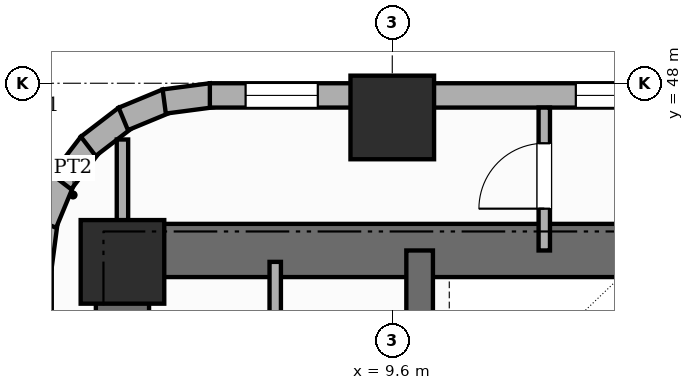
"""IFC4 building model, lengths in metres.
Left out: names, types, materials, properties, quantities, classifications, styles, units other than length and angle.
Written with IfcOpenShell. Run it as: python <this file> out.ifc"""

import sys

from ifc_helpers import new_model, si_unit, direction, frame, frame_2d, origin, origin_2d, place, context, subcontext, project, spatial, rectangle, extrude, element, fill, save


model = new_model("IFC4")
c1 = context("Model", 3, precision=1e-05, world=origin(), true_north=direction((0.0, 1.0)))
c2 = subcontext(c1, "Body", "Model", "MODEL_VIEW")
j1 = project(units=[si_unit("LENGTHUNIT", "METRE"), si_unit("PLANEANGLEUNIT", "RADIAN")], contexts=[c1])
p1 = place(None, origin())
s1 = spatial("IfcSite", under=j1, at=p1, CompositionType="ELEMENT")
p2 = place(p1, origin())
s2 = spatial("IfcBuilding", under=s1, at=p2, CompositionType="ELEMENT")
p3 = place(p2, frame((0.0, 0.0, 28.6)))
s3 = spatial("IfcBuildingStorey", under=s2, at=p3, CompositionType="ELEMENT", Elevation=28.6)
p4 = place(p3, frame((6.05, 30.55, 0.0), z_axis=(0.0, 0.0, 1.0), x_axis=(0.0, 1.0, 0.0)))
e1 = element("IfcWall", 1, at=p4, inside=s3, PredefinedType="SHEAR", context=c2, shape_type="SweptSolid", body=[
    extrude(rectangle(XDim=15.6, YDim=0.7, at=frame_2d((7.8, 0.0))), origin(), (0.0, 0.0, 1.0), 3.6),
])
p5 = place(p3, frame((6.05, 45.8, 0.0), z_axis=(0.0, 0.0, 1.0), x_axis=(1.0, 0.0, 0.0)))
e2 = element("IfcWall", 2, at=p5, inside=s3, PredefinedType="SHEAR", context=c2, shape_type="SweptSolid", body=[
    extrude(rectangle(XDim=16.7, YDim=0.7, at=frame_2d((8.35, 0.0))), origin(), (0.0, 0.0, 1.0), 3.6),
])
p6 = place(p3, frame((9.96, 30.9, 0.0), z_axis=(0.0, 0.0, 1.0), x_axis=(0.0, 1.0, 0.0)))
e3 = element("IfcWall", 3, at=p6, inside=s3, PredefinedType="SHEAR", context=c2, shape_type="SweptSolid", body=[
    extrude(rectangle(XDim=14.9, YDim=0.35, at=frame_2d((7.45, 0.0))), origin(), (0.0, 0.0, 1.0), 3.6),
])
p7 = place(p6, frame((0.65, 0.0, 0.0)))
e4 = element("IfcOpeningElement", 4, at=p7, cuts=e3, PredefinedType="OPENING", context=c2, shape_type="SweptSolid", body=[
    extrude(rectangle(XDim=0.95, YDim=2.1, at=frame_2d((0.475, 1.05))), frame((0.0, 0.185, 0.0), z_axis=(0.0, -1.0, 0.0), x_axis=(1.0, 0.0, 0.0)), (0.0, 0.0, 1.0), 0.37),
])
p8 = place(p6, frame((10.45, 0.0, 0.0)))
e5 = element("IfcOpeningElement", 5, at=p8, cuts=e3, PredefinedType="OPENING", context=c2, shape_type="SweptSolid", body=[
    extrude(rectangle(XDim=1.0, YDim=2.15, at=frame_2d((0.5, 1.075))), frame((0.0, 0.185, 0.0), z_axis=(0.0, -1.0, 0.0), x_axis=(1.0, 0.0, 0.0)), (0.0, 0.0, 1.0), 0.37),
])
for number, where, z_axis, x_axis in (
    (6, (6.05, 45.65, 0.0), (0.0, 0.0, 1.0), (1.0, 0.0, 0.0)),
    (7, (9.6, 47.55, 0.0), (0.0, 0.0, 1.0), (1.0, 0.0, 0.0)),
):
    element("IfcColumn", number, at=place(p3, frame(where, z_axis=z_axis, x_axis=x_axis)), inside=s3, PredefinedType="COLUMN", context=c2, shape_type="SweptSolid", body=[
        extrude(rectangle(XDim=1.1, YDim=1.1, at=origin_2d()), origin(), (0.0, 0.0, 1.0), 3.6),
    ])
for number, where, z_axis, x_axis in (
    (8, (4.958, 45.579, 0.0), (0.0, 0.0, 1.0), (0.131, 0.991, 0.0)),
    (9, (5.03, 46.16, 0.0), (0.0, 0.0, 1.0), (0.383, 0.924, 0.0)),
):
    element("IfcWall", number, at=place(p3, frame(where, z_axis=z_axis, x_axis=x_axis)), inside=s3, PredefinedType="STANDARD", context=c2, shape_type="SweptSolid", body=[
        extrude(rectangle(XDim=0.626, YDim=0.32, at=frame_2d((0.313, 0.0))), origin(), (0.0, 0.0, 1.0), 3.35),
    ])
p9 = place(p3, frame((5.248, 46.703, 0.0), z_axis=(0.0, 0.0, 1.0), x_axis=(0.608938521285, 0.7932174212, 0.0)))
e10 = element("IfcWall", 10, at=p9, inside=s3, PredefinedType="STANDARD", context=c2, shape_type="SweptSolid", body=[
    extrude(rectangle(XDim=0.627, YDim=0.32, at=frame_2d((0.313, 0.0))), origin(), (0.0, 0.0, 1.0), 3.35),
])
p10 = place(p3, frame((5.6, 47.17, 0.0), z_axis=(0.0, 0.0, 1.0), x_axis=(0.793405610854, 0.608693302629, 0.0)))
e11 = element("IfcWall", 11, at=p10, inside=s3, PredefinedType="STANDARD", context=c2, shape_type="SweptSolid", body=[
    extrude(rectangle(XDim=0.626, YDim=0.32, at=frame_2d((0.313, 0.0))), origin(), (0.0, 0.0, 1.0), 3.35),
])
p11 = place(p3, frame((6.061, 47.531, 0.0), z_axis=(0.0, 0.0, 1.0), x_axis=(0.923836271867, 0.382787856107, 0.0)))
e12 = element("IfcWall", 12, at=p11, inside=s3, PredefinedType="STANDARD", context=c2, shape_type="SweptSolid", body=[
    extrude(rectangle(XDim=0.626, YDim=0.32, at=frame_2d((0.313, 0.0))), origin(), (0.0, 0.0, 1.0), 3.35),
])
p12 = place(p3, frame((6.6, 47.76, 0.0), z_axis=(0.0, 0.0, 1.0), x_axis=(0.991447664465, 0.130504898859, 0.0)))
e13 = element("IfcWall", 13, at=p12, inside=s3, PredefinedType="STANDARD", context=c2, shape_type="SweptSolid", body=[
    extrude(rectangle(XDim=0.627, YDim=0.32, at=frame_2d((0.313, 0.0))), origin(), (0.0, 0.0, 1.0), 3.35),
])
p13 = place(p3, frame((7.2, 47.84, 0.0), z_axis=(0.0, 0.0, 1.0), x_axis=(1.0, 0.0, 0.0)))
e14 = element("IfcWall", 14, at=p13, inside=s3, PredefinedType="STANDARD", context=c2, shape_type="SweptSolid", body=[
    extrude(rectangle(XDim=48.0, YDim=0.32, at=frame_2d((24.0, 0.0))), origin(), (0.0, 0.0, 1.0), 2.53),
])
p14 = place(p13, frame((24.97, 0.0, 0.45)))
e15 = element("IfcOpeningElement", 15, at=p14, cuts=e14, PredefinedType="OPENING", context=c2, shape_type="SweptSolid", body=[
    extrude(rectangle(XDim=0.6, YDim=1.8, at=frame_2d((0.3, 0.9))), frame((0.0, 0.17, 0.0), z_axis=(0.0, -1.0, 0.0), x_axis=(1.0, 0.0, 0.0)), (0.0, 0.0, 1.0), 0.34),
])
p15 = place(p13, frame((32.435, 0.0, 0.65)))
e16 = element("IfcOpeningElement", 16, at=p15, cuts=e14, PredefinedType="OPENING", context=c2, shape_type="SweptSolid", body=[
    extrude(rectangle(XDim=1.4, YDim=1.1, at=frame_2d((0.7, 0.55))), frame((0.0, 0.17, 0.0), z_axis=(0.0, -1.0, 0.0), x_axis=(1.0, 0.0, 0.0)), (0.0, 0.0, 1.0), 0.34),
])
p16 = place(p13, frame((47.094, 0.0, 0.45)))
e17 = element("IfcOpeningElement", 17, at=p16, cuts=e14, PredefinedType="OPENING", context=c2, shape_type="SweptSolid", body=[
    extrude(rectangle(XDim=0.6, YDim=1.8, at=frame_2d((0.3, 0.9))), frame((0.0, 0.17, 0.0), z_axis=(0.0, -1.0, 0.0), x_axis=(1.0, 0.0, 0.0)), (0.0, 0.0, 1.0), 0.34),
])
p17 = place(p13, frame((18.74, 0.0, 0.45)))
e18 = element("IfcOpeningElement", 18, at=p17, cuts=e14, PredefinedType="OPENING", context=c2, shape_type="SweptSolid", body=[
    extrude(rectangle(XDim=0.95, YDim=1.8, at=frame_2d((0.475, 0.9))), frame((0.0, 0.17, 0.0), z_axis=(0.0, -1.0, 0.0), x_axis=(1.0, 0.0, 0.0)), (0.0, 0.0, 1.0), 0.34),
])
p18 = place(p13, frame((41.65, 0.0, 0.45)))
e19 = element("IfcOpeningElement", 19, at=p18, cuts=e14, PredefinedType="OPENING", context=c2, shape_type="SweptSolid", body=[
    extrude(rectangle(XDim=0.75, YDim=1.8, at=frame_2d((0.375, 0.9))), frame((0.0, 0.17, 0.0), z_axis=(0.0, -1.0, 0.0), x_axis=(1.0, 0.0, 0.0)), (0.0, 0.0, 1.0), 0.34),
])
p19 = place(p13, frame((37.736, 0.0, 0.65)))
e20 = element("IfcOpeningElement", 20, at=p19, cuts=e14, PredefinedType="OPENING", context=c2, shape_type="SweptSolid", body=[
    extrude(rectangle(XDim=1.4, YDim=1.1, at=frame_2d((0.7, 0.55))), frame((0.0, 0.17, 0.0), z_axis=(0.0, -1.0, 0.0), x_axis=(1.0, 0.0, 0.0)), (0.0, 0.0, 1.0), 0.34),
])
p20 = place(p13, frame((0.47, 0.0, 0.45)))
e21 = element("IfcOpeningElement", 21, at=p20, cuts=e14, PredefinedType="OPENING", context=c2, shape_type="SweptSolid", body=[
    extrude(rectangle(XDim=0.95, YDim=1.8, at=frame_2d((0.475, 0.9))), frame((0.0, 0.17, 0.0), z_axis=(0.0, -1.0, 0.0), x_axis=(1.0, 0.0, 0.0)), (0.0, 0.0, 1.0), 0.34),
])
p21 = place(p13, frame((4.815, 0.0, 0.65)))
e22 = element("IfcOpeningElement", 22, at=p21, cuts=e14, PredefinedType="OPENING", context=c2, shape_type="SweptSolid", body=[
    extrude(rectangle(XDim=1.4, YDim=1.1, at=frame_2d((0.7, 0.55))), frame((0.0, 0.17, 0.0), z_axis=(0.0, -1.0, 0.0), x_axis=(1.0, 0.0, 0.0)), (0.0, 0.0, 1.0), 0.34),
])
p22 = place(p13, frame((22.87, 0.0, 0.65)))
e23 = element("IfcOpeningElement", 23, at=p22, cuts=e14, PredefinedType="OPENING", context=c2, shape_type="SweptSolid", body=[
    extrude(rectangle(XDim=1.4, YDim=1.1, at=frame_2d((0.7, 0.55))), frame((0.0, 0.17, 0.0), z_axis=(0.0, -1.0, 0.0), x_axis=(1.0, 0.0, 0.0)), (0.0, 0.0, 1.0), 0.34),
])
p23 = place(p13, frame((28.03, 0.0, 0.65)))
e24 = element("IfcOpeningElement", 24, at=p23, cuts=e14, PredefinedType="OPENING", context=c2, shape_type="SweptSolid", body=[
    extrude(rectangle(XDim=1.4, YDim=1.1, at=frame_2d((0.7, 0.55))), frame((0.0, 0.17, 0.0), z_axis=(0.0, -1.0, 0.0), x_axis=(1.0, 0.0, 0.0)), (0.0, 0.0, 1.0), 0.34),
])
p24 = place(p13, frame((42.95, 0.0, 0.65)))
e25 = element("IfcOpeningElement", 25, at=p24, cuts=e14, PredefinedType="OPENING", context=c2, shape_type="SweptSolid", body=[
    extrude(rectangle(XDim=1.4, YDim=1.1, at=frame_2d((0.7, 0.55))), frame((0.0, 0.17, 0.0), z_axis=(0.0, -1.0, 0.0), x_axis=(1.0, 0.0, 0.0)), (0.0, 0.0, 1.0), 0.34),
])
p25 = place(p13, frame((45.984, 0.0, 0.45)))
e26 = element("IfcOpeningElement", 26, at=p25, cuts=e14, PredefinedType="OPENING", context=c2, shape_type="SweptSolid", body=[
    extrude(rectangle(XDim=0.6, YDim=1.8, at=frame_2d((0.3, 0.9))), frame((0.0, 0.17, 0.0), z_axis=(0.0, -1.0, 0.0), x_axis=(1.0, 0.0, 0.0)), (0.0, 0.0, 1.0), 0.34),
])
p26 = place(p3, frame((8.06, 43.05, 0.0), z_axis=(0.0, 0.0, 1.0), x_axis=(0.0, 1.0, 0.0)))
e27 = element("IfcWall", 27, at=p26, inside=s3, PredefinedType="PARTITIONING", context=c2, shape_type="SweptSolid", body=[
    extrude(rectangle(XDim=2.6, YDim=0.15, at=frame_2d((1.3, 0.0))), origin(), (0.0, 0.0, 1.0), 3.35),
])
p27 = place(p3, frame((6.05, 45.8, 0.0), z_axis=(0.0, 0.0, 1.0), x_axis=(0.0, 1.0, 0.0)))
e28 = element("IfcWall", 28, at=p27, inside=s3, PredefinedType="PARTITIONING", context=c2, shape_type="SweptSolid", body=[
    extrude(rectangle(XDim=1.46, YDim=0.15, at=frame_2d((0.73, 0.0))), origin(), (0.0, 0.0, 1.0), 3.35),
])
p28 = place(p3, frame((11.6, 45.8, 0.0), z_axis=(0.0, 0.0, 1.0), x_axis=(0.0, 1.0, 0.0)))
e29 = element("IfcWall", 29, at=p28, inside=s3, PredefinedType="PARTITIONING", context=c2, shape_type="SweptSolid", body=[
    extrude(rectangle(XDim=1.88, YDim=0.15, at=frame_2d((0.94, 0.0))), origin(), (0.0, 0.0, 1.0), 3.35),
])
p29 = place(p28, frame((0.55, 0.0, 0.0)))
e30 = element("IfcOpeningElement", 30, at=p29, cuts=e29, PredefinedType="OPENING", context=c2, shape_type="SweptSolid", body=[
    extrude(rectangle(XDim=0.86, YDim=2.1, at=frame_2d((0.43, 1.05))), frame((0.0, 0.085, 0.0), z_axis=(0.0, -1.0, 0.0), x_axis=(1.0, 0.0, 0.0)), (0.0, 0.0, 1.0), 0.17),
])
p30 = place(p20, origin())
e31 = element("IfcWindow", 31, at=p30, inside=s3, PartitioningType="SINGLE_PANEL", PredefinedType="WINDOW", context=c2, shape_type="SweptSolid", body=[
    extrude(rectangle(XDim=0.95, YDim=1.8, at=frame_2d((0.475, 0.9))), frame((0.0, 0.03, 0.0), z_axis=(0.0, -1.0, 0.0), x_axis=(1.0, 0.0, 0.0)), (0.0, 0.0, 1.0), 0.06),
])
fill(e21, e31)
p31 = place(p21, origin())
e32 = element("IfcWindow", 32, at=p31, inside=s3, PartitioningType="SINGLE_PANEL", PredefinedType="WINDOW", context=c2, shape_type="SweptSolid", body=[
    extrude(rectangle(XDim=1.4, YDim=1.1, at=frame_2d((0.7, 0.55))), frame((0.0, 0.03, 0.0), z_axis=(0.0, -1.0, 0.0), x_axis=(1.0, 0.0, 0.0)), (0.0, 0.0, 1.0), 0.06),
])
fill(e22, e32)
p32 = place(p29, origin())
e33 = element("IfcDoor", 33, at=p32, inside=s3, OperationType="SINGLE_SWING_LEFT", PredefinedType="DOOR", context=c2, shape_type="SweptSolid", body=[
    extrude(rectangle(XDim=0.86, YDim=2.1, at=frame_2d((0.43, 1.05))), frame((0.0, 0.025, 0.0), z_axis=(0.0, -1.0, 0.0), x_axis=(1.0, 0.0, 0.0)), (0.0, 0.0, 1.0), 0.05),
])
fill(e30, e33)
save(model, sys.argv[1])
